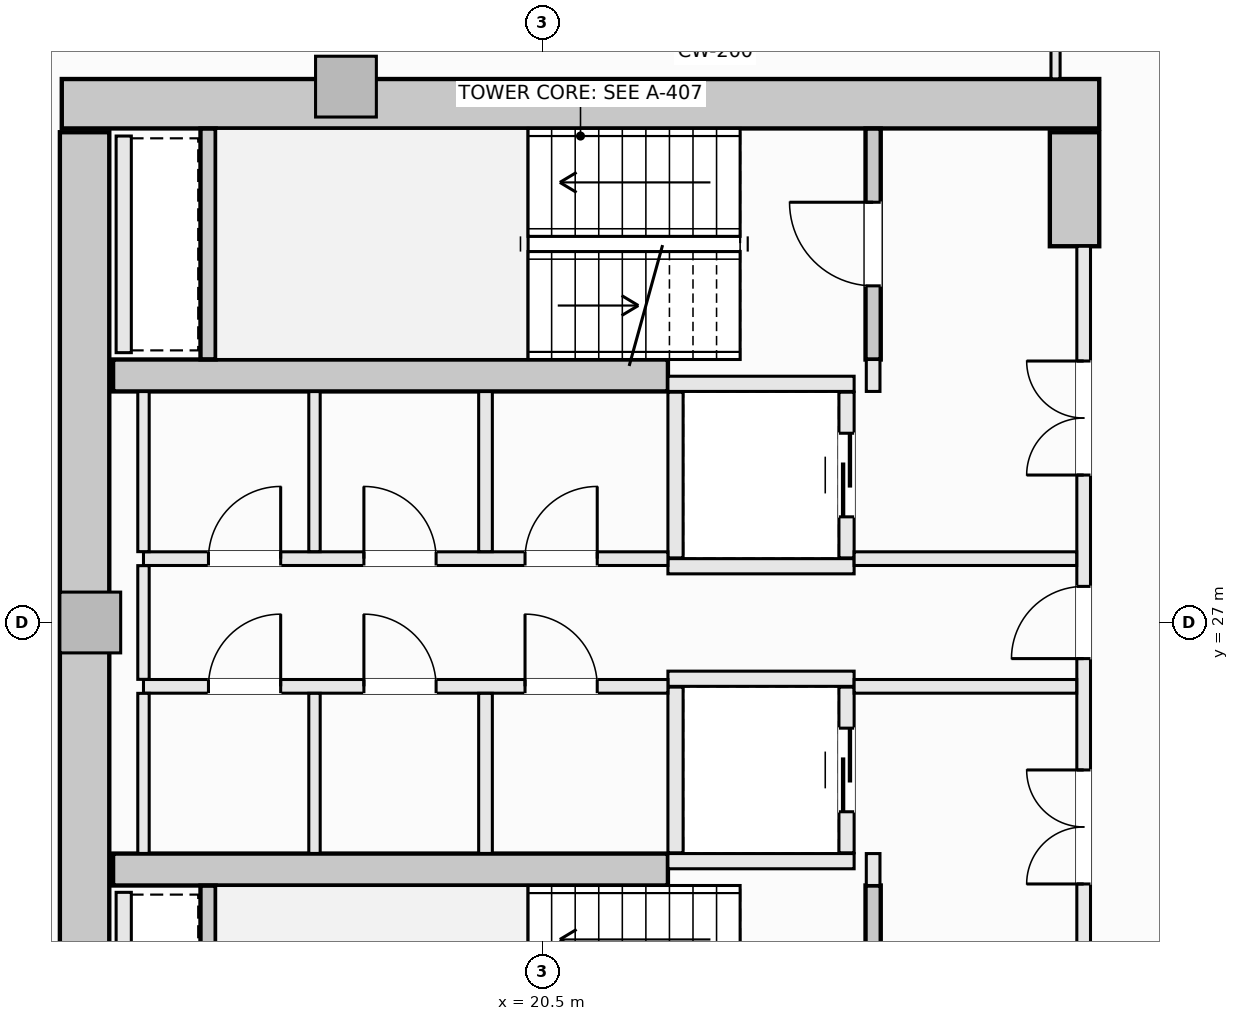
"""IFC4 building model, lengths in metres.
Left out: names, types, materials, properties, quantities, classifications, styles, units other than length and angle.
Written with IfcOpenShell. Run it as: python <this file> out.ifc"""

import sys

from ifc_helpers import new_model, si_unit, direction, frame, frame_2d, origin, origin_2d, place, context, subcontext, project, spatial, rectangle, extrude, element, fill, save


model = new_model("IFC4")
c1 = context("Model", 3, precision=1e-05, world=origin(), true_north=direction((0.0, 1.0)))
c2 = subcontext(c1, "Body", "Model", "MODEL_VIEW")
j1 = project(units=[si_unit("LENGTHUNIT", "METRE"), si_unit("PLANEANGLEUNIT", "RADIAN")], contexts=[c1])
p1 = place(None, origin())
s1 = spatial("IfcSite", under=j1, at=p1, CompositionType="ELEMENT")
p2 = place(p1, origin())
s2 = spatial("IfcBuilding", under=s1, at=p2, CompositionType="ELEMENT")
p3 = place(p2, frame((0.0, 0.0, 176.7)))
s3 = spatial("IfcBuildingStorey", under=s2, at=p3, CompositionType="ELEMENT", Elevation=176.7)
p4 = place(p3, frame((14.175, 33.825, -0.27), z_axis=(0.0, 0.0, 1.0), x_axis=(1.0, 0.0, 0.0)))
e1 = element("IfcWall", 1, at=p4, inside=s3, PredefinedType="SHEAR", context=c2, shape_type="SweptSolid", body=[
    extrude(rectangle(XDim=13.65, YDim=0.65, at=frame_2d((6.825, 0.0))), origin(), (0.0, 0.0, 1.0), 3.4),
])
p5 = place(p3, frame((14.475, 20.55, -0.27), z_axis=(0.0, 0.0, 1.0), x_axis=(0.0, 1.0, 0.0)))
e2 = element("IfcWall", 2, at=p5, inside=s3, PredefinedType="SHEAR", context=c2, shape_type="SweptSolid", body=[
    extrude(rectangle(XDim=12.9, YDim=0.65, at=frame_2d((6.45, 0.0))), origin(), (0.0, 0.0, 1.0), 3.4),
])
p6 = place(p3, frame((27.5, 31.95, -0.27), z_axis=(0.0, 0.0, 1.0), x_axis=(0.0, 1.0, 0.0)))
e3 = element("IfcWall", 3, at=p6, inside=s3, PredefinedType="SHEAR", context=c2, shape_type="SweptSolid", body=[
    extrude(rectangle(XDim=1.5, YDim=0.65, at=frame_2d((0.75, 0.0))), origin(), (0.0, 0.0, 1.0), 3.4),
])
for number, where, z_axis, x_axis in (
    (4, (14.85, 30.25, -0.27), (0.0, 0.0, 1.0), (1.0, 0.0, 0.0)),
    (5, (14.85, 23.75, -0.27), (0.0, 0.0, 1.0), (1.0, 0.0, 0.0)),
):
    element("IfcWall", number, at=place(p3, frame(where, z_axis=z_axis, x_axis=x_axis)), inside=s3, PredefinedType="SHEAR", context=c2, shape_type="SweptSolid", body=[
        extrude(rectangle(XDim=7.3, YDim=0.42, at=frame_2d((3.65, 0.0))), origin(), (0.0, 0.0, 1.0), 3.4),
    ])
for number, where, z_axis, x_axis in (
    (6, (17.914, 34.05, -0.27), (0.0, 0.0, 1.0), (1.0, 0.0, 0.0)),
    (7, (14.55, 27.0, -0.27), (0.0, 0.0, 1.0), (1.0, 0.0, 0.0)),
):
    element("IfcColumn", number, at=place(p3, frame(where, z_axis=z_axis, x_axis=x_axis)), inside=s3, PredefinedType="PILASTER", context=c2, shape_type="SweptSolid", body=[
        extrude(rectangle(XDim=0.8, YDim=0.8, at=origin_2d()), origin(), (0.0, 0.0, 1.0), 3.4),
    ])
p7 = place(p3, frame((24.85, 30.46, -0.27), z_axis=(0.0, 0.0, 1.0), x_axis=(0.0, 1.0, 0.0)))
e8 = element("IfcWall", 8, at=p7, inside=s3, PredefinedType="SHEAR", context=c2, shape_type="SweptSolid", body=[
    extrude(rectangle(XDim=3.038, YDim=0.2, at=frame_2d((1.519, 0.0))), origin(), (0.0, 0.0, 1.0), 3.4),
])
p8 = place(p7, frame((0.969, 0.0, 0.27)))
e9 = element("IfcOpeningElement", 9, at=p8, cuts=e8, PredefinedType="OPENING", context=c2, shape_type="SweptSolid", body=[
    extrude(rectangle(XDim=1.1, YDim=2.15, at=frame_2d((0.55, 1.075))), frame((0.0, 0.11, 0.0), z_axis=(0.0, -1.0, 0.0), x_axis=(1.0, 0.0, 0.0)), (0.0, 0.0, 1.0), 0.22),
])
p9 = place(p3, frame((16.1, 30.462, -0.27), z_axis=(0.0, 0.0, 1.0), x_axis=(0.0, 1.0, 0.0)))
e10 = element("IfcWall", 10, at=p9, inside=s3, PredefinedType="SHEAR", context=c2, shape_type="SweptSolid", body=[
    extrude(rectangle(XDim=3.036, YDim=0.2, at=frame_2d((1.518, 0.0))), origin(), (0.0, 0.0, 1.0), 3.4),
])
p10 = place(p3, frame((24.85, 20.502, -0.27), z_axis=(0.0, 0.0, 1.0), x_axis=(0.0, 1.0, 0.0)))
e11 = element("IfcWall", 11, at=p10, inside=s3, PredefinedType="SHEAR", context=c2, shape_type="SweptSolid", body=[
    extrude(rectangle(XDim=3.038, YDim=0.2, at=frame_2d((1.519, 0.0))), origin(), (0.0, 0.0, 1.0), 3.4),
])
p11 = place(p10, frame((0.969, 0.0, 0.27)))
e12 = element("IfcOpeningElement", 12, at=p11, cuts=e11, PredefinedType="OPENING", context=c2, shape_type="SweptSolid", body=[
    extrude(rectangle(XDim=1.1, YDim=2.15, at=frame_2d((0.55, 1.075))), frame((0.0, 0.11, 0.0), z_axis=(0.0, -1.0, 0.0), x_axis=(1.0, 0.0, 0.0)), (0.0, 0.0, 1.0), 0.22),
])
p12 = place(p3, frame((16.1, 20.502, -0.27), z_axis=(0.0, 0.0, 1.0), x_axis=(0.0, 1.0, 0.0)))
e13 = element("IfcWall", 13, at=p12, inside=s3, PredefinedType="SHEAR", context=c2, shape_type="SweptSolid", body=[
    extrude(rectangle(XDim=3.036, YDim=0.2, at=frame_2d((1.518, 0.0))), origin(), (0.0, 0.0, 1.0), 3.4),
])
for number, where, z_axis, x_axis in (
    (14, (22.15, 30.14, 0.0), (0.0, 0.0, 1.0), (1.0, 0.0, 0.0)),
    (15, (22.15, 27.74, 0.0), (0.0, 0.0, 1.0), (1.0, 0.0, 0.0)),
):
    element("IfcWall", number, at=place(p3, frame(where, z_axis=z_axis, x_axis=x_axis)), inside=s3, PredefinedType="SOLIDWALL", context=c2, shape_type="SweptSolid", body=[
        extrude(rectangle(XDim=2.45, YDim=0.2, at=frame_2d((1.225, 0.0))), origin(), (0.0, 0.0, 1.0), 3.13),
    ])
p13 = place(p3, frame((22.25, 27.85, 0.0), z_axis=(0.0, 0.0, 1.0), x_axis=(0.0, 1.0, 0.0)))
e16 = element("IfcWall", 16, at=p13, inside=s3, PredefinedType="SOLIDWALL", context=c2, shape_type="SweptSolid", body=[
    extrude(rectangle(XDim=2.18, YDim=0.2, at=frame_2d((1.09, 0.0))), origin(), (0.0, 0.0, 1.0), 3.13),
])
p14 = place(p3, frame((24.5, 27.85, 0.0), z_axis=(0.0, 0.0, 1.0), x_axis=(0.0, 1.0, 0.0)))
e17 = element("IfcWall", 17, at=p14, inside=s3, PredefinedType="SOLIDWALL", context=c2, shape_type="SweptSolid", body=[
    extrude(rectangle(XDim=2.18, YDim=0.2, at=frame_2d((1.09, 0.0))), origin(), (0.0, 0.0, 1.0), 3.13),
])
p15 = place(p14, frame((0.54, 0.0, 0.0)))
e18 = element("IfcOpeningElement", 18, at=p15, cuts=e17, PredefinedType="OPENING", context=c2, shape_type="SweptSolid", body=[
    extrude(rectangle(XDim=1.1, YDim=2.2, at=frame_2d((0.55, 1.1))), frame((0.0, 0.11, 0.0), z_axis=(0.0, -1.0, 0.0), x_axis=(1.0, 0.0, 0.0)), (0.0, 0.0, 1.0), 0.22),
])
for number, where, z_axis, x_axis in (
    (19, (22.15, 26.26, 0.0), (0.0, 0.0, 1.0), (1.0, 0.0, 0.0)),
    (20, (22.15, 23.86, 0.0), (0.0, 0.0, 1.0), (1.0, 0.0, 0.0)),
):
    element("IfcWall", number, at=place(p3, frame(where, z_axis=z_axis, x_axis=x_axis)), inside=s3, PredefinedType="SOLIDWALL", context=c2, shape_type="SweptSolid", body=[
        extrude(rectangle(XDim=2.45, YDim=0.2, at=frame_2d((1.225, 0.0))), origin(), (0.0, 0.0, 1.0), 3.13),
    ])
p16 = place(p3, frame((22.25, 23.97, 0.0), z_axis=(0.0, 0.0, 1.0), x_axis=(0.0, 1.0, 0.0)))
e21 = element("IfcWall", 21, at=p16, inside=s3, PredefinedType="SOLIDWALL", context=c2, shape_type="SweptSolid", body=[
    extrude(rectangle(XDim=2.18, YDim=0.2, at=frame_2d((1.09, 0.0))), origin(), (0.0, 0.0, 1.0), 3.13),
])
p17 = place(p3, frame((24.5, 23.97, 0.0), z_axis=(0.0, 0.0, 1.0), x_axis=(0.0, 1.0, 0.0)))
e22 = element("IfcWall", 22, at=p17, inside=s3, PredefinedType="SOLIDWALL", context=c2, shape_type="SweptSolid", body=[
    extrude(rectangle(XDim=2.18, YDim=0.2, at=frame_2d((1.09, 0.0))), origin(), (0.0, 0.0, 1.0), 3.13),
])
p18 = place(p17, frame((0.54, 0.0, 0.0)))
e23 = element("IfcOpeningElement", 23, at=p18, cuts=e22, PredefinedType="OPENING", context=c2, shape_type="SweptSolid", body=[
    extrude(rectangle(XDim=1.1, YDim=2.2, at=frame_2d((0.55, 1.1))), frame((0.0, 0.11, 0.0), z_axis=(0.0, -1.0, 0.0), x_axis=(1.0, 0.0, 0.0)), (0.0, 0.0, 1.0), 0.22),
])
for number, where, z_axis, x_axis in (
    (24, (14.99, 30.55, 0.0), (0.0, 0.0, 1.0), (0.0, 1.0, 0.0)),
    (25, (14.99, 20.6, 0.0), (0.0, 0.0, 1.0), (0.0, 1.0, 0.0)),
):
    element("IfcWall", number, at=place(p3, frame(where, z_axis=z_axis, x_axis=x_axis)), inside=s3, PredefinedType="SOLIDWALL", context=c2, shape_type="SweptSolid", body=[
        extrude(rectangle(XDim=2.85, YDim=0.2, at=frame_2d((1.425, 0.0))), origin(), (0.0, 0.0, 1.0), 3.13),
    ])
for number, where, z_axis, x_axis in (
    (26, (24.85, 23.54, 0.0), (0.0, 0.0, 1.0), (0.0, 1.0, 0.0)),
    (27, (24.85, 30.04, 0.0), (0.0, 0.0, 1.0), (0.0, 1.0, 0.0)),
):
    element("IfcWall", number, at=place(p3, frame(where, z_axis=z_axis, x_axis=x_axis)), inside=s3, PredefinedType="SOLIDWALL", context=c2, shape_type="SweptSolid", body=[
        extrude(rectangle(XDim=0.42, YDim=0.18, at=frame_2d((0.21, 0.0))), origin(), (0.0, 0.0, 1.0), 3.13),
    ])
p19 = place(p3, frame((27.62, 22.05, 0.0), z_axis=(0.0, 0.0, 1.0), x_axis=(0.0, 1.0, 0.0)))
e28 = element("IfcWall", 28, at=p19, inside=s3, PredefinedType="SOLIDWALL", context=c2, shape_type="SweptSolid", body=[
    extrude(rectangle(XDim=9.9, YDim=0.18, at=frame_2d((4.95, 0.0))), origin(), (0.0, 0.0, 1.0), 3.13),
])
p20 = place(p19, frame((4.475, 0.0, 0.0)))
e29 = element("IfcOpeningElement", 29, at=p20, cuts=e28, PredefinedType="OPENING", context=c2, shape_type="SweptSolid", body=[
    extrude(rectangle(XDim=0.95, YDim=2.1, at=frame_2d((0.475, 1.05))), frame((0.0, 0.1, 0.0), z_axis=(0.0, -1.0, 0.0), x_axis=(1.0, 0.0, 0.0)), (0.0, 0.0, 1.0), 0.2),
])
p21 = place(p19, frame((6.89, 0.0, 0.0)))
e30 = element("IfcOpeningElement", 30, at=p21, cuts=e28, PredefinedType="OPENING", context=c2, shape_type="SweptSolid", body=[
    extrude(rectangle(XDim=1.5, YDim=2.2, at=frame_2d((0.75, 1.1))), frame((0.0, 0.1, 0.0), z_axis=(0.0, -1.0, 0.0), x_axis=(1.0, 0.0, 0.0)), (0.0, 0.0, 1.0), 0.2),
])
p22 = place(p19, frame((1.51, 0.0, 0.0)))
e31 = element("IfcOpeningElement", 31, at=p22, cuts=e28, PredefinedType="OPENING", context=c2, shape_type="SweptSolid", body=[
    extrude(rectangle(XDim=1.5, YDim=2.2, at=frame_2d((0.75, 1.1))), frame((0.0, 0.1, 0.0), z_axis=(0.0, -1.0, 0.0), x_axis=(1.0, 0.0, 0.0)), (0.0, 0.0, 1.0), 0.2),
])
p23 = place(p3, frame((15.25, 27.84, 0.0), z_axis=(0.0, 0.0, 1.0), x_axis=(1.0, 0.0, 0.0)))
e32 = element("IfcWall", 32, at=p23, inside=s3, PredefinedType="SOLIDWALL", context=c2, shape_type="SweptSolid", body=[
    extrude(rectangle(XDim=6.9, YDim=0.18, at=frame_2d((3.45, 0.0))), origin(), (0.0, 0.0, 1.0), 3.13),
])
p24 = place(p23, frame((5.02, 0.0, 0.0)))
e33 = element("IfcOpeningElement", 33, at=p24, cuts=e32, PredefinedType="OPENING", context=c2, shape_type="SweptSolid", body=[
    extrude(rectangle(XDim=0.95, YDim=2.1, at=frame_2d((0.475, 1.05))), frame((0.0, 0.1, 0.0), z_axis=(0.0, -1.0, 0.0), x_axis=(1.0, 0.0, 0.0)), (0.0, 0.0, 1.0), 0.2),
])
p25 = place(p23, frame((0.855, 0.0, 0.0)))
e34 = element("IfcOpeningElement", 34, at=p25, cuts=e32, PredefinedType="OPENING", context=c2, shape_type="SweptSolid", body=[
    extrude(rectangle(XDim=0.95, YDim=2.1, at=frame_2d((0.475, 1.05))), frame((0.0, 0.1, 0.0), z_axis=(0.0, -1.0, 0.0), x_axis=(1.0, 0.0, 0.0)), (0.0, 0.0, 1.0), 0.2),
])
p26 = place(p23, frame((2.9, 0.0, 0.0)))
e35 = element("IfcOpeningElement", 35, at=p26, cuts=e32, PredefinedType="OPENING", context=c2, shape_type="SweptSolid", body=[
    extrude(rectangle(XDim=0.95, YDim=2.1, at=frame_2d((0.475, 1.05))), frame((0.0, 0.1, 0.0), z_axis=(0.0, -1.0, 0.0), x_axis=(1.0, 0.0, 0.0)), (0.0, 0.0, 1.0), 0.2),
])
p27 = place(p3, frame((24.6, 27.84, 0.0), z_axis=(0.0, 0.0, 1.0), x_axis=(1.0, 0.0, 0.0)))
e36 = element("IfcWall", 36, at=p27, inside=s3, PredefinedType="SOLIDWALL", context=c2, shape_type="SweptSolid", body=[
    extrude(rectangle(XDim=2.928, YDim=0.18, at=frame_2d((1.464, 0.0))), origin(), (0.0, 0.0, 1.0), 3.13),
])
p28 = place(p3, frame((15.25, 26.16, 0.0), z_axis=(0.0, 0.0, 1.0), x_axis=(1.0, 0.0, 0.0)))
e37 = element("IfcWall", 37, at=p28, inside=s3, PredefinedType="SOLIDWALL", context=c2, shape_type="SweptSolid", body=[
    extrude(rectangle(XDim=6.9, YDim=0.18, at=frame_2d((3.45, 0.0))), origin(), (0.0, 0.0, 1.0), 3.13),
])
p29 = place(p28, frame((5.02, 0.0, 0.0)))
e38 = element("IfcOpeningElement", 38, at=p29, cuts=e37, PredefinedType="OPENING", context=c2, shape_type="SweptSolid", body=[
    extrude(rectangle(XDim=0.95, YDim=2.1, at=frame_2d((0.475, 1.05))), frame((0.0, 0.1, 0.0), z_axis=(0.0, -1.0, 0.0), x_axis=(1.0, 0.0, 0.0)), (0.0, 0.0, 1.0), 0.2),
])
p30 = place(p28, frame((0.855, 0.0, 0.0)))
e39 = element("IfcOpeningElement", 39, at=p30, cuts=e37, PredefinedType="OPENING", context=c2, shape_type="SweptSolid", body=[
    extrude(rectangle(XDim=0.95, YDim=2.1, at=frame_2d((0.475, 1.05))), frame((0.0, 0.1, 0.0), z_axis=(0.0, -1.0, 0.0), x_axis=(1.0, 0.0, 0.0)), (0.0, 0.0, 1.0), 0.2),
])
p31 = place(p28, frame((2.9, 0.0, 0.0)))
e40 = element("IfcOpeningElement", 40, at=p31, cuts=e37, PredefinedType="OPENING", context=c2, shape_type="SweptSolid", body=[
    extrude(rectangle(XDim=0.95, YDim=2.1, at=frame_2d((0.475, 1.05))), frame((0.0, 0.1, 0.0), z_axis=(0.0, -1.0, 0.0), x_axis=(1.0, 0.0, 0.0)), (0.0, 0.0, 1.0), 0.2),
])
p32 = place(p3, frame((24.6, 26.16, 0.0), z_axis=(0.0, 0.0, 1.0), x_axis=(1.0, 0.0, 0.0)))
e41 = element("IfcWall", 41, at=p32, inside=s3, PredefinedType="SOLIDWALL", context=c2, shape_type="SweptSolid", body=[
    extrude(rectangle(XDim=2.928, YDim=0.18, at=frame_2d((1.464, 0.0))), origin(), (0.0, 0.0, 1.0), 3.13),
])
p33 = place(p3, frame((15.25, 23.962, 0.0), z_axis=(0.0, 0.0, 1.0), x_axis=(0.0, 1.0, 0.0)))
e42 = element("IfcWall", 42, at=p33, inside=s3, PredefinedType="PARTITIONING", context=c2, shape_type="SweptSolid", body=[
    extrude(rectangle(XDim=2.106, YDim=0.15, at=frame_2d((1.053, 0.0))), origin(), (0.0, 0.0, 1.0), 3.13),
])
p34 = place(p3, frame((15.25, 26.252, 0.0), z_axis=(0.0, 0.0, 1.0), x_axis=(0.0, 1.0, 0.0)))
e43 = element("IfcWall", 43, at=p34, inside=s3, PredefinedType="PARTITIONING", context=c2, shape_type="SweptSolid", body=[
    extrude(rectangle(XDim=1.496, YDim=0.15, at=frame_2d((0.748, 0.0))), origin(), (0.0, 0.0, 1.0), 3.13),
])
p35 = place(p3, frame((15.25, 27.932, 0.0), z_axis=(0.0, 0.0, 1.0), x_axis=(0.0, 1.0, 0.0)))
e44 = element("IfcWall", 44, at=p35, inside=s3, PredefinedType="PARTITIONING", context=c2, shape_type="SweptSolid", body=[
    extrude(rectangle(XDim=2.106, YDim=0.15, at=frame_2d((1.053, 0.0))), origin(), (0.0, 0.0, 1.0), 3.13),
])
for number, where, z_axis, x_axis in (
    (45, (19.75, 23.962, 0.0), (0.0, 0.0, 1.0), (0.0, 1.0, 0.0)),
    (46, (19.75, 27.932, 0.0), (0.0, 0.0, 1.0), (0.0, 1.0, 0.0)),
):
    element("IfcWall", number, at=place(p3, frame(where, z_axis=z_axis, x_axis=x_axis)), inside=s3, PredefinedType="SOLIDWALL", context=c2, shape_type="SweptSolid", body=[
        extrude(rectangle(XDim=2.106, YDim=0.18, at=frame_2d((1.053, 0.0))), origin(), (0.0, 0.0, 1.0), 3.13),
    ])
for number, where, z_axis, x_axis in (
    (47, (17.5, 23.962, 0.0), (0.0, 0.0, 1.0), (0.0, 1.0, 0.0)),
    (48, (17.5, 27.932, 0.0), (0.0, 0.0, 1.0), (0.0, 1.0, 0.0)),
):
    element("IfcWall", number, at=place(p3, frame(where, z_axis=z_axis, x_axis=x_axis)), inside=s3, PredefinedType="PARTITIONING", context=c2, shape_type="SweptSolid", body=[
        extrude(rectangle(XDim=2.106, YDim=0.15, at=frame_2d((1.053, 0.0))), origin(), (0.0, 0.0, 1.0), 3.13),
    ])
p36 = place(p3, frame((27.25, 34.152, 0.0), z_axis=(0.0, 0.0, 1.0), x_axis=(0.0, 1.0, 0.0)))
e49 = element("IfcWall", 49, at=p36, inside=s3, PredefinedType="PARTITIONING", context=c2, shape_type="SweptSolid", body=[
    extrude(rectangle(XDim=0.806, YDim=0.12, at=frame_2d((0.403, 0.0))), origin(), (0.0, 0.0, 1.0), 3.13),
])
p37 = place(p8, origin())
e50 = element("IfcDoor", 50, at=p37, inside=s3, OperationType="SINGLE_SWING_RIGHT", PredefinedType="DOOR", context=c2, shape_type="SweptSolid", body=[
    extrude(rectangle(XDim=1.1, YDim=2.15, at=frame_2d((0.55, 1.075))), frame((0.0, 0.025, 0.0), z_axis=(0.0, -1.0, 0.0), x_axis=(1.0, 0.0, 0.0)), (0.0, 0.0, 1.0), 0.05),
])
fill(e9, e50)
p38 = place(p15, origin())
e51 = element("IfcDoor", 51, at=p38, inside=s3, OperationType="SLIDING_TO_LEFT", PredefinedType="DOOR", context=c2, shape_type="SweptSolid", body=[
    extrude(rectangle(XDim=1.1, YDim=2.2, at=frame_2d((0.55, 1.1))), frame((0.0, 0.025, 0.0), z_axis=(0.0, -1.0, 0.0), x_axis=(1.0, 0.0, 0.0)), (0.0, 0.0, 1.0), 0.05),
])
fill(e18, e51)
p39 = place(p18, origin())
e52 = element("IfcDoor", 52, at=p39, inside=s3, OperationType="SLIDING_TO_LEFT", PredefinedType="DOOR", context=c2, shape_type="SweptSolid", body=[
    extrude(rectangle(XDim=1.1, YDim=2.2, at=frame_2d((0.55, 1.1))), frame((0.0, 0.025, 0.0), z_axis=(0.0, -1.0, 0.0), x_axis=(1.0, 0.0, 0.0)), (0.0, 0.0, 1.0), 0.05),
])
fill(e23, e52)
p40 = place(p20, origin())
e53 = element("IfcDoor", 53, at=p40, inside=s3, OperationType="SINGLE_SWING_LEFT", PredefinedType="DOOR", context=c2, shape_type="SweptSolid", body=[
    extrude(rectangle(XDim=0.95, YDim=2.1, at=frame_2d((0.475, 1.05))), frame((0.0, 0.025, 0.0), z_axis=(0.0, -1.0, 0.0), x_axis=(1.0, 0.0, 0.0)), (0.0, 0.0, 1.0), 0.05),
])
fill(e29, e53)
p41 = place(p21, origin())
e54 = element("IfcDoor", 54, at=p41, inside=s3, OperationType="DOUBLE_DOOR_SINGLE_SWING", PredefinedType="DOOR", context=c2, shape_type="SweptSolid", body=[
    extrude(rectangle(XDim=1.5, YDim=2.2, at=frame_2d((0.75, 1.1))), frame((0.0, 0.025, 0.0), z_axis=(0.0, -1.0, 0.0), x_axis=(1.0, 0.0, 0.0)), (0.0, 0.0, 1.0), 0.05),
])
fill(e30, e54)
p42 = place(p22, origin())
e55 = element("IfcDoor", 55, at=p42, inside=s3, OperationType="DOUBLE_DOOR_SINGLE_SWING", PredefinedType="DOOR", context=c2, shape_type="SweptSolid", body=[
    extrude(rectangle(XDim=1.5, YDim=2.2, at=frame_2d((0.75, 1.1))), frame((0.0, 0.025, 0.0), z_axis=(0.0, -1.0, 0.0), x_axis=(1.0, 0.0, 0.0)), (0.0, 0.0, 1.0), 0.05),
])
fill(e31, e55)
p43 = place(p24, origin())
e56 = element("IfcDoor", 56, at=p43, inside=s3, OperationType="SINGLE_SWING_RIGHT", PredefinedType="DOOR", context=c2, shape_type="SweptSolid", body=[
    extrude(rectangle(XDim=0.95, YDim=2.1, at=frame_2d((0.475, 1.05))), frame((0.0, 0.025, 0.0), z_axis=(0.0, -1.0, 0.0), x_axis=(1.0, 0.0, 0.0)), (0.0, 0.0, 1.0), 0.05),
])
fill(e33, e56)
p44 = place(p29, origin())
e57 = element("IfcDoor", 57, at=p44, inside=s3, OperationType="SINGLE_SWING_LEFT", PredefinedType="DOOR", context=c2, shape_type="SweptSolid", body=[
    extrude(rectangle(XDim=0.95, YDim=2.1, at=frame_2d((0.475, 1.05))), frame((0.0, 0.025, 0.0), z_axis=(0.0, -1.0, 0.0), x_axis=(1.0, 0.0, 0.0)), (0.0, 0.0, 1.0), 0.05),
])
fill(e38, e57)
p45 = place(p25, origin())
e58 = element("IfcDoor", 58, at=p45, inside=s3, OperationType="SINGLE_SWING_RIGHT", PredefinedType="DOOR", context=c2, shape_type="SweptSolid", body=[
    extrude(rectangle(XDim=0.95, YDim=2.1, at=frame_2d((0.475, 1.05))), frame((0.0, 0.025, 0.0), z_axis=(0.0, -1.0, 0.0), x_axis=(1.0, 0.0, 0.0)), (0.0, 0.0, 1.0), 0.05),
])
fill(e34, e58)
p46 = place(p26, origin())
e59 = element("IfcDoor", 59, at=p46, inside=s3, OperationType="SINGLE_SWING_LEFT", PredefinedType="DOOR", context=c2, shape_type="SweptSolid", body=[
    extrude(rectangle(XDim=0.95, YDim=2.1, at=frame_2d((0.475, 1.05))), frame((0.0, 0.025, 0.0), z_axis=(0.0, -1.0, 0.0), x_axis=(1.0, 0.0, 0.0)), (0.0, 0.0, 1.0), 0.05),
])
fill(e35, e59)
p47 = place(p30, origin())
e60 = element("IfcDoor", 60, at=p47, inside=s3, OperationType="SINGLE_SWING_RIGHT", PredefinedType="DOOR", context=c2, shape_type="SweptSolid", body=[
    extrude(rectangle(XDim=0.95, YDim=2.1, at=frame_2d((0.475, 1.05))), frame((0.0, 0.025, 0.0), z_axis=(0.0, -1.0, 0.0), x_axis=(1.0, 0.0, 0.0)), (0.0, 0.0, 1.0), 0.05),
])
fill(e39, e60)
p48 = place(p31, origin())
e61 = element("IfcDoor", 61, at=p48, inside=s3, OperationType="SINGLE_SWING_LEFT", PredefinedType="DOOR", context=c2, shape_type="SweptSolid", body=[
    extrude(rectangle(XDim=0.95, YDim=2.1, at=frame_2d((0.475, 1.05))), frame((0.0, 0.025, 0.0), z_axis=(0.0, -1.0, 0.0), x_axis=(1.0, 0.0, 0.0)), (0.0, 0.0, 1.0), 0.05),
])
fill(e40, e61)
save(model, sys.argv[1])
